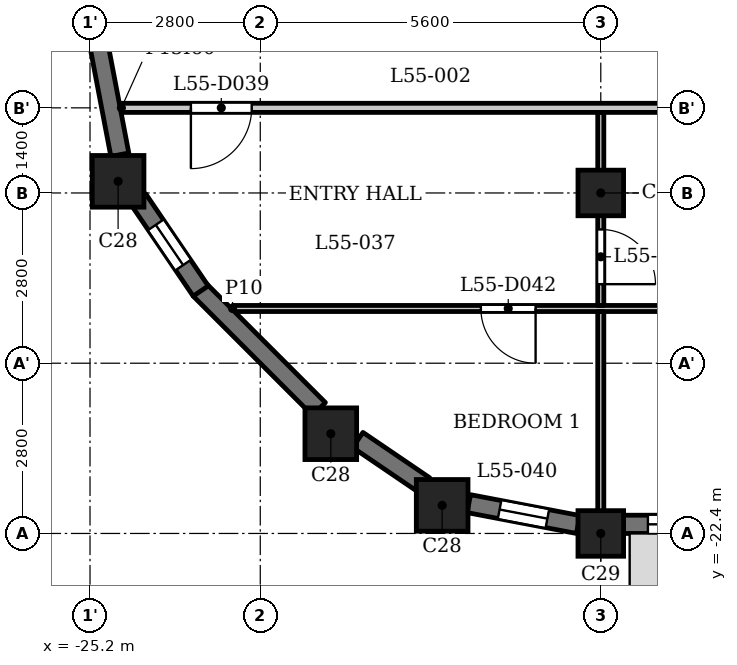
"""IFC4 building model, lengths in metres.
Left out: names, types, materials, properties, quantities, classifications, styles, units other than length and angle.
Written with IfcOpenShell. Run it as: python <this file> out.ifc"""

import sys

from ifc_helpers import new_model, si_unit, direction, frame, frame_2d, origin, origin_2d, place, context, subcontext, project, spatial, rectangle, extrude, element, fill, save


model = new_model("IFC4")
c1 = context("Model", 3, precision=1e-05, world=origin(), true_north=direction((0.0, 1.0)))
c2 = subcontext(c1, "Body", "Model", "MODEL_VIEW")
j1 = project(units=[si_unit("LENGTHUNIT", "METRE"), si_unit("PLANEANGLEUNIT", "RADIAN")], contexts=[c1])
p1 = place(None, origin())
s1 = spatial("IfcSite", under=j1, at=p1, CompositionType="ELEMENT")
p2 = place(p1, origin())
s2 = spatial("IfcBuilding", under=s1, at=p2, CompositionType="ELEMENT")
p3 = place(p2, frame((0.0, 0.0, 213.4)))
s3 = spatial("IfcBuildingStorey", under=s2, at=p3, CompositionType="ELEMENT", Elevation=213.4)
for number, where, z_axis, x_axis in (
    (1, (-19.409, -21.938, 0.0), (0.0, 0.0, 1.0), (1.0, 0.0, 0.0)),
    (2, (-24.738, -16.609, 0.0), (0.0, 0.0, 1.0), (1.0, 0.0, 0.0)),
    (3, (-21.24, -20.76, 0.0), (0.0, 0.0, 1.0), (1.0, 0.0, 0.0)),
):
    element("IfcColumn", number, at=place(p3, frame(where, z_axis=z_axis, x_axis=x_axis)), inside=s3, PredefinedType="COLUMN", context=c2, shape_type="SweptSolid", body=[
        extrude(rectangle(XDim=0.85, YDim=0.85, at=origin_2d()), origin(), (0.0, 0.0, 1.0), 3.5),
    ])
for number, where, z_axis, x_axis in (
    (4, (-16.8, -22.4, 0.0), (0.0, 0.0, 1.0), (1.0, 0.0, 0.0)),
    (5, (-16.8, -16.8, 0.0), (0.0, 0.0, 1.0), (1.0, 0.0, 0.0)),
):
    element("IfcColumn", number, at=place(p3, frame(where, z_axis=z_axis, x_axis=x_axis)), inside=s3, PredefinedType="COLUMN", context=c2, shape_type="SweptSolid", body=[
        extrude(rectangle(XDim=0.75, YDim=0.75, at=origin_2d()), origin(), (0.0, 0.0, 1.0), 3.5),
    ])
p4 = place(p3, frame((-23.397, -18.391, 0.0), z_axis=(0.0, 0.0, 1.0), x_axis=(0.707106781187, -0.707106781187, 0.0)))
e6 = element("IfcWall", 6, at=p4, inside=s3, PredefinedType="SOLIDWALL", context=c2, shape_type="SweptSolid", body=[
    extrude(rectangle(XDim=2.775, YDim=0.3, at=frame_2d((1.388, 0.0))), origin(), (0.0, 0.0, 1.0), 2.5),
])
p5 = place(p3, frame((-20.796, -20.862, 0.0), z_axis=(0.0, 0.0, 1.0), x_axis=(0.827035970432, -0.562149004813, 0.0)))
e7 = element("IfcWall", 7, at=p5, inside=s3, PredefinedType="SOLIDWALL", context=c2, shape_type="SweptSolid", body=[
    extrude(rectangle(XDim=1.327, YDim=0.3, at=frame_2d((0.664, 0.0))), origin(), (0.0, 0.0, 1.0), 2.5),
])
p6 = place(p3, frame((-18.971, -21.91, 0.0), z_axis=(0.0, 0.0, 1.0), x_axis=(0.982300037503, -0.187314271538, 0.0)))
e8 = element("IfcWall", 8, at=p6, inside=s3, PredefinedType="SOLIDWALL", context=c2, shape_type="SweptSolid", body=[
    extrude(rectangle(XDim=1.831, YDim=0.3, at=frame_2d((0.916, 0.0))), origin(), (0.0, 0.0, 1.0), 2.5),
])
p7 = place(p6, frame((0.516, 0.0, 0.6)))
e9 = element("IfcOpeningElement", 9, at=p7, cuts=e8, PredefinedType="OPENING", context=c2, shape_type="SweptSolid", body=[
    extrude(rectangle(XDim=0.8, YDim=1.55, at=frame_2d((0.4, 0.775))), frame((0.0, 0.16, 0.0), z_axis=(0.0, -1.0, 0.0), x_axis=(1.0, 0.0, 0.0)), (0.0, 0.0, 1.0), 0.32),
])
p8 = place(p3, frame((-16.425, -22.25, 0.0), z_axis=(0.0, 0.0, 1.0), x_axis=(1.0, 0.0, 0.0)))
e10 = element("IfcWall", 10, at=p8, inside=s3, PredefinedType="SOLIDWALL", context=c2, shape_type="SweptSolid", body=[
    extrude(rectangle(XDim=2.0, YDim=0.3, at=frame_2d((1.0, 0.0))), origin(), (0.0, 0.0, 1.0), 2.5),
])
p9 = place(p8, frame((0.4, 0.0, 0.6)))
e11 = element("IfcOpeningElement", 11, at=p9, cuts=e10, PredefinedType="OPENING", context=c2, shape_type="SweptSolid", body=[
    extrude(rectangle(XDim=1.2, YDim=1.55, at=frame_2d((0.6, 0.775))), frame((0.0, 0.16, 0.0), z_axis=(0.0, -1.0, 0.0), x_axis=(1.0, 0.0, 0.0)), (0.0, 0.0, 1.0), 0.32),
])
p10 = place(p3, frame((-25.053, -14.372, 0.0), z_axis=(0.0, 0.0, 1.0), x_axis=(0.187442908742, -0.982275499014, 0.0)))
e12 = element("IfcWall", 12, at=p10, inside=s3, PredefinedType="SOLIDWALL", context=c2, shape_type="SweptSolid", body=[
    extrude(rectangle(XDim=1.831, YDim=0.3, at=frame_2d((0.916, 0.0))), origin(), (0.0, 0.0, 1.0), 2.5),
])
p11 = place(p3, frame((-24.408, -16.898, 0.0), z_axis=(0.0, 0.0, 1.0), x_axis=(0.562062033417, -0.827095079535, 0.0)))
e13 = element("IfcWall", 13, at=p11, inside=s3, PredefinedType="SOLIDWALL", context=c2, shape_type="SweptSolid", body=[
    extrude(rectangle(XDim=1.831, YDim=0.3, at=frame_2d((0.916, 0.0))), origin(), (0.0, 0.0, 1.0), 2.5),
])
p12 = place(p11, frame((0.516, 0.0, 0.6)))
e14 = element("IfcOpeningElement", 14, at=p12, cuts=e13, PredefinedType="OPENING", context=c2, shape_type="SweptSolid", body=[
    extrude(rectangle(XDim=0.8, YDim=1.55, at=frame_2d((0.4, 0.775))), frame((0.0, 0.16, 0.0), z_axis=(0.0, -1.0, 0.0), x_axis=(1.0, 0.0, 0.0)), (0.0, 0.0, 1.0), 0.32),
])
p13 = place(p3, frame((-22.856, -18.7, 0.0), z_axis=(0.0, 0.0, 1.0), x_axis=(1.0, 0.0, 0.0)))
e15 = element("IfcWall", 15, at=p13, inside=s3, PredefinedType="PARTITIONING", context=c2, shape_type="SweptSolid", body=[
    extrude(rectangle(XDim=45.711, YDim=0.1, at=frame_2d((22.856, 0.0))), origin(), (0.0, 0.0, 1.0), 3.2),
])
p14 = place(p13, frame((4.084, 0.0, 0.0)))
e16 = element("IfcOpeningElement", 16, at=p14, cuts=e15, PredefinedType="OPENING", context=c2, shape_type="SweptSolid", body=[
    extrude(rectangle(XDim=0.9, YDim=2.1, at=frame_2d((0.45, 1.05))), frame((0.0, 0.06, 0.0), z_axis=(0.0, -1.0, 0.0), x_axis=(1.0, 0.0, 0.0)), (0.0, 0.0, 1.0), 0.12),
])
p15 = place(p13, frame((7.456, 0.0, 0.0)))
e17 = element("IfcOpeningElement", 17, at=p15, cuts=e15, PredefinedType="OPENING", context=c2, shape_type="SweptSolid", body=[
    extrude(rectangle(XDim=0.9, YDim=2.1, at=frame_2d((0.45, 1.05))), frame((0.0, 0.06, 0.0), z_axis=(0.0, -1.0, 0.0), x_axis=(1.0, 0.0, 0.0)), (0.0, 0.0, 1.0), 0.12),
])
p16 = place(p13, frame((23.506, 0.0, 0.0)))
e18 = element("IfcOpeningElement", 18, at=p16, cuts=e15, PredefinedType="OPENING", context=c2, shape_type="SweptSolid", body=[
    extrude(rectangle(XDim=0.8, YDim=2.1, at=frame_2d((0.4, 1.05))), frame((0.0, 0.06, 0.0), z_axis=(0.0, -1.0, 0.0), x_axis=(1.0, 0.0, 0.0)), (0.0, 0.0, 1.0), 0.12),
])
p17 = place(p13, frame((17.906, 0.0, 0.0)))
e19 = element("IfcOpeningElement", 19, at=p17, cuts=e15, PredefinedType="OPENING", context=c2, shape_type="SweptSolid", body=[
    extrude(rectangle(XDim=0.9, YDim=2.1, at=frame_2d((0.45, 1.05))), frame((0.0, 0.06, 0.0), z_axis=(0.0, -1.0, 0.0), x_axis=(1.0, 0.0, 0.0)), (0.0, 0.0, 1.0), 0.12),
])
p18 = place(p13, frame((43.806, 0.0, 0.0)))
e20 = element("IfcOpeningElement", 20, at=p18, cuts=e15, PredefinedType="OPENING", context=c2, shape_type="SweptSolid", body=[
    extrude(rectangle(XDim=0.9, YDim=2.1, at=frame_2d((0.45, 1.05))), frame((0.0, 0.06, 0.0), z_axis=(0.0, -1.0, 0.0), x_axis=(1.0, 0.0, 0.0)), (0.0, 0.0, 1.0), 0.12),
])
p19 = place(p13, frame((34.706, 0.0, 0.0)))
e21 = element("IfcOpeningElement", 21, at=p19, cuts=e15, PredefinedType="OPENING", context=c2, shape_type="SweptSolid", body=[
    extrude(rectangle(XDim=0.9, YDim=2.1, at=frame_2d((0.45, 1.05))), frame((0.0, 0.06, 0.0), z_axis=(0.0, -1.0, 0.0), x_axis=(1.0, 0.0, 0.0)), (0.0, 0.0, 1.0), 0.12),
])
p20 = place(p3, frame((-24.684, -15.4, 0.0), z_axis=(0.0, 0.0, 1.0), x_axis=(1.0, 0.0, 0.0)))
e22 = element("IfcWall", 22, at=p20, inside=s3, PredefinedType="PARTITIONING", context=c2, shape_type="SweptSolid", body=[
    extrude(rectangle(XDim=49.368, YDim=0.15, at=frame_2d((24.684, 0.0))), origin(), (0.0, 0.0, 1.0), 3.2),
])
p21 = place(p20, frame((1.143, 0.0, 0.0)))
e23 = element("IfcOpeningElement", 23, at=p21, cuts=e22, PredefinedType="OPENING", context=c2, shape_type="SweptSolid", body=[
    extrude(rectangle(XDim=1.0, YDim=2.1, at=frame_2d((0.5, 1.05))), frame((0.0, 0.085, 0.0), z_axis=(0.0, -1.0, 0.0), x_axis=(1.0, 0.0, 0.0)), (0.0, 0.0, 1.0), 0.17),
])
p22 = place(p20, frame((19.734, 0.0, 0.0)))
e24 = element("IfcOpeningElement", 24, at=p22, cuts=e22, PredefinedType="OPENING", context=c2, shape_type="SweptSolid", body=[
    extrude(rectangle(XDim=1.0, YDim=2.1, at=frame_2d((0.5, 1.05))), frame((0.0, 0.085, 0.0), z_axis=(0.0, -1.0, 0.0), x_axis=(1.0, 0.0, 0.0)), (0.0, 0.0, 1.0), 0.17),
])
p23 = place(p20, frame((42.134, 0.0, 0.0)))
e25 = element("IfcOpeningElement", 25, at=p23, cuts=e22, PredefinedType="OPENING", context=c2, shape_type="SweptSolid", body=[
    extrude(rectangle(XDim=1.0, YDim=2.1, at=frame_2d((0.5, 1.05))), frame((0.0, 0.085, 0.0), z_axis=(0.0, -1.0, 0.0), x_axis=(1.0, 0.0, 0.0)), (0.0, 0.0, 1.0), 0.17),
])
p24 = place(p3, frame((-16.8, -22.31, 0.0), z_axis=(0.0, 0.0, 1.0), x_axis=(0.0, 1.0, 0.0)))
e26 = element("IfcWall", 26, at=p24, inside=s3, PredefinedType="PARTITIONING", context=c2, shape_type="SweptSolid", body=[
    extrude(rectangle(XDim=3.56, YDim=0.1, at=frame_2d((1.78, 0.0))), origin(), (0.0, 0.0, 1.0), 2.55),
])
p25 = place(p3, frame((-16.8, -18.65, 0.0), z_axis=(0.0, 0.0, 1.0), x_axis=(0.0, 1.0, 0.0)))
e27 = element("IfcWall", 27, at=p25, inside=s3, PredefinedType="PARTITIONING", context=c2, shape_type="SweptSolid", body=[
    extrude(rectangle(XDim=3.175, YDim=0.1, at=frame_2d((1.587, 0.0))), origin(), (0.0, 0.0, 1.0), 2.55),
])
p26 = place(p25, frame((0.35, 0.0, 0.0)))
e28 = element("IfcOpeningElement", 28, at=p26, cuts=e27, PredefinedType="OPENING", context=c2, shape_type="SweptSolid", body=[
    extrude(rectangle(XDim=0.9, YDim=2.1, at=frame_2d((0.45, 1.05))), frame((0.0, 0.06, 0.0), z_axis=(0.0, -1.0, 0.0), x_axis=(1.0, 0.0, 0.0)), (0.0, 0.0, 1.0), 0.12),
])
p27 = place(p21, origin())
e29 = element("IfcDoor", 29, at=p27, inside=s3, OperationType="SINGLE_SWING_LEFT", PredefinedType="DOOR", context=c2, shape_type="SweptSolid", body=[
    extrude(rectangle(XDim=1.0, YDim=2.1, at=frame_2d((0.5, 1.05))), frame((0.0, 0.025, 0.0), z_axis=(0.0, -1.0, 0.0), x_axis=(1.0, 0.0, 0.0)), (0.0, 0.0, 1.0), 0.05),
])
fill(e23, e29)
p28 = place(p26, origin())
e30 = element("IfcDoor", 30, at=p28, inside=s3, OperationType="SINGLE_SWING_LEFT", PredefinedType="DOOR", context=c2, shape_type="SweptSolid", body=[
    extrude(rectangle(XDim=0.9, YDim=2.1, at=frame_2d((0.45, 1.05))), frame((0.0, 0.025, 0.0), z_axis=(0.0, -1.0, 0.0), x_axis=(1.0, 0.0, 0.0)), (0.0, 0.0, 1.0), 0.05),
])
fill(e28, e30)
p29 = place(p14, origin())
e31 = element("IfcDoor", 31, at=p29, inside=s3, OperationType="SINGLE_SWING_RIGHT", PredefinedType="DOOR", context=c2, shape_type="SweptSolid", body=[
    extrude(rectangle(XDim=0.9, YDim=2.1, at=frame_2d((0.45, 1.05))), frame((0.0, 0.025, 0.0), z_axis=(0.0, -1.0, 0.0), x_axis=(1.0, 0.0, 0.0)), (0.0, 0.0, 1.0), 0.05),
])
fill(e16, e31)
p30 = place(p7, origin())
e32 = element("IfcWindow", 32, at=p30, inside=s3, PartitioningType="SINGLE_PANEL", PredefinedType="WINDOW", context=c2, shape_type="SweptSolid", body=[
    extrude(rectangle(XDim=0.8, YDim=1.55, at=frame_2d((0.4, 0.775))), frame((0.0, 0.03, 0.0), z_axis=(0.0, -1.0, 0.0), x_axis=(1.0, 0.0, 0.0)), (0.0, 0.0, 1.0), 0.06),
])
fill(e9, e32)
p31 = place(p9, origin())
e33 = element("IfcWindow", 33, at=p31, inside=s3, PartitioningType="SINGLE_PANEL", PredefinedType="WINDOW", context=c2, shape_type="SweptSolid", body=[
    extrude(rectangle(XDim=1.2, YDim=1.55, at=frame_2d((0.6, 0.775))), frame((0.0, 0.03, 0.0), z_axis=(0.0, -1.0, 0.0), x_axis=(1.0, 0.0, 0.0)), (0.0, 0.0, 1.0), 0.06),
])
fill(e11, e33)
p32 = place(p12, origin())
e34 = element("IfcWindow", 34, at=p32, inside=s3, PartitioningType="SINGLE_PANEL", PredefinedType="WINDOW", context=c2, shape_type="SweptSolid", body=[
    extrude(rectangle(XDim=0.8, YDim=1.55, at=frame_2d((0.4, 0.775))), frame((0.0, 0.03, 0.0), z_axis=(0.0, -1.0, 0.0), x_axis=(1.0, 0.0, 0.0)), (0.0, 0.0, 1.0), 0.06),
])
fill(e14, e34)
save(model, sys.argv[1])
